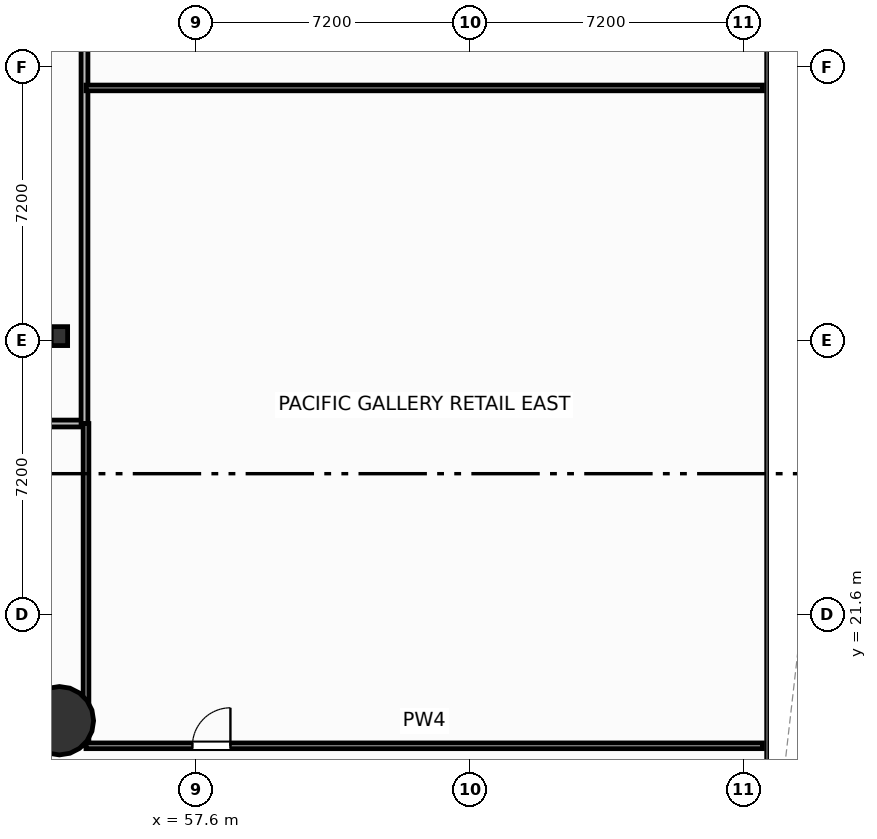
"""IFC4 building model, lengths in metres.
Left out: names, types, materials, properties, quantities, classifications, styles, units other than length and angle.
Written with IfcOpenShell. Run it as: python <this file> out.ifc"""

import sys

from ifc_helpers import new_model, si_unit, direction, frame, frame_2d, origin, origin_2d, place, context, subcontext, project, spatial, rectangle, circle, i_section, extrude, element, fill, save


model = new_model("IFC4")
c1 = context("Model", 3, precision=1e-05, world=origin(), true_north=direction((0.0, 1.0)))
c2 = subcontext(c1, "Body", "Model", "MODEL_VIEW")
j1 = project(units=[si_unit("LENGTHUNIT", "METRE"), si_unit("PLANEANGLEUNIT", "RADIAN")], contexts=[c1])
p1 = place(None, origin())
s1 = spatial("IfcSite", under=j1, at=p1, CompositionType="ELEMENT")
p2 = place(p1, origin())
s2 = spatial("IfcBuilding", under=s1, at=p2, CompositionType="ELEMENT")
p3 = place(p2, origin())
s3 = spatial("IfcBuildingStorey", under=s2, at=p3, CompositionType="ELEMENT", Elevation=0.0)
p4 = place(p3, frame((54.0, 28.92, 0.0), z_axis=(0.0, 0.0, 1.0), x_axis=(1.0, 0.0, 0.0)))
e1 = element("IfcColumn", 1, at=p4, inside=s3, PredefinedType="COLUMN", context=c2, shape_type="SweptSolid", body=[
    extrude(i_section(OverallWidth=0.432, OverallDepth=0.498, WebThickness=0.056, FlangeThickness=0.089, FilletRadius=0.025, at=origin_2d()), origin(), (0.0, 0.0, 1.0), 5.4),
])
p5 = place(p3, frame((54.0, 18.8, 0.0), z_axis=(0.0, 0.0, 1.0), x_axis=(1.0, 0.0, 0.0)))
e2 = element("IfcColumn", 2, at=p5, inside=s3, PredefinedType="COLUMN", context=c2, shape_type="SweptSolid", body=[
    extrude(circle(Radius=0.9, at=origin_2d()), origin(), (0.0, 0.0, 1.0), 5.4),
])
p6 = place(p3, frame((43.68, 26.62, 0.0), z_axis=(0.0, 0.0, 1.0), x_axis=(1.0, 0.0, 0.0)))
e3 = element("IfcWall", 3, at=p6, inside=s3, PredefinedType="PARTITIONING", context=c2, shape_type="SweptSolid", body=[
    extrude(rectangle(XDim=10.98, YDim=0.18, at=frame_2d((5.49, 0.0))), origin(), (0.0, 0.0, 1.0), 5.12),
])
p7 = place(p6, frame((5.03, 0.0, 0.0)))
e4 = element("IfcOpeningElement", 4, at=p7, cuts=e3, PredefinedType="OPENING", context=c2, shape_type="SweptSolid", body=[
    extrude(rectangle(XDim=1.1, YDim=2.15, at=frame_2d((0.55, 1.075))), frame((0.0, 0.1, 0.0), z_axis=(0.0, -1.0, 0.0), x_axis=(1.0, 0.0, 0.0)), (0.0, 0.0, 1.0), 0.2),
])
p8 = place(p3, frame((54.66, 26.62, 0.0), z_axis=(0.0, 0.0, 1.0), x_axis=(0.0, 1.0, 0.0)))
e5 = element("IfcWall", 5, at=p8, inside=s3, PredefinedType="PARTITIONING", context=c2, shape_type="SweptSolid", body=[
    extrude(rectangle(XDim=11.86, YDim=0.18, at=frame_2d((5.93, 0.0))), origin(), (0.0, 0.0, 1.0), 5.12),
])
p9 = place(p3, frame((54.7, 18.14, 0.0), z_axis=(0.0, 0.0, 1.0), x_axis=(0.0, 1.0, 0.0)))
e6 = element("IfcWall", 6, at=p9, inside=s3, PredefinedType="PARTITIONING", context=c2, shape_type="SweptSolid", body=[
    extrude(rectangle(XDim=8.48, YDim=0.15, at=frame_2d((4.24, 0.0))), origin(), (0.0, 0.0, 1.0), 5.12),
])
p10 = place(p3, frame((54.7, 18.14, 0.0), z_axis=(0.0, 0.0, 1.0), x_axis=(1.0, 0.0, 0.0)))
e7 = element("IfcWall", 7, at=p10, inside=s3, PredefinedType="PARTITIONING", context=c2, shape_type="SweptSolid", body=[
    extrude(rectangle(XDim=17.8, YDim=0.15, at=frame_2d((8.9, 0.0))), origin(), (0.0, 0.0, 1.0), 4.085),
])
p11 = place(p10, frame((2.8, 0.0, 0.0)))
e8 = element("IfcOpeningElement", 8, at=p11, cuts=e7, PredefinedType="OPENING", context=c2, shape_type="SweptSolid", body=[
    extrude(rectangle(XDim=1.0, YDim=2.05, at=frame_2d((0.5, 1.025))), frame((0.0, 0.085, 0.0), z_axis=(0.0, -1.0, 0.0), x_axis=(1.0, 0.0, 0.0)), (0.0, 0.0, 1.0), 0.17),
])
p12 = place(p3, frame((54.7, 35.45, 0.0), z_axis=(0.0, 0.0, 1.0), x_axis=(1.0, 0.0, 0.0)))
e9 = element("IfcWall", 9, at=p12, inside=s3, PredefinedType="PARTITIONING", context=c2, shape_type="SweptSolid", body=[
    extrude(rectangle(XDim=17.8, YDim=0.15, at=frame_2d((8.9, 0.0))), origin(), (0.0, 0.0, 1.0), 5.12),
])
p13 = place(p11, origin())
e10 = element("IfcDoor", 10, at=p13, inside=s3, OperationType="SINGLE_SWING_RIGHT", PredefinedType="DOOR", context=c2, shape_type="SweptSolid", body=[
    extrude(rectangle(XDim=1.0, YDim=2.05, at=frame_2d((0.5, 1.025))), frame((0.0, 0.025, 0.0), z_axis=(0.0, -1.0, 0.0), x_axis=(1.0, 0.0, 0.0)), (0.0, 0.0, 1.0), 0.05),
])
fill(e8, e10)
save(model, sys.argv[1])
